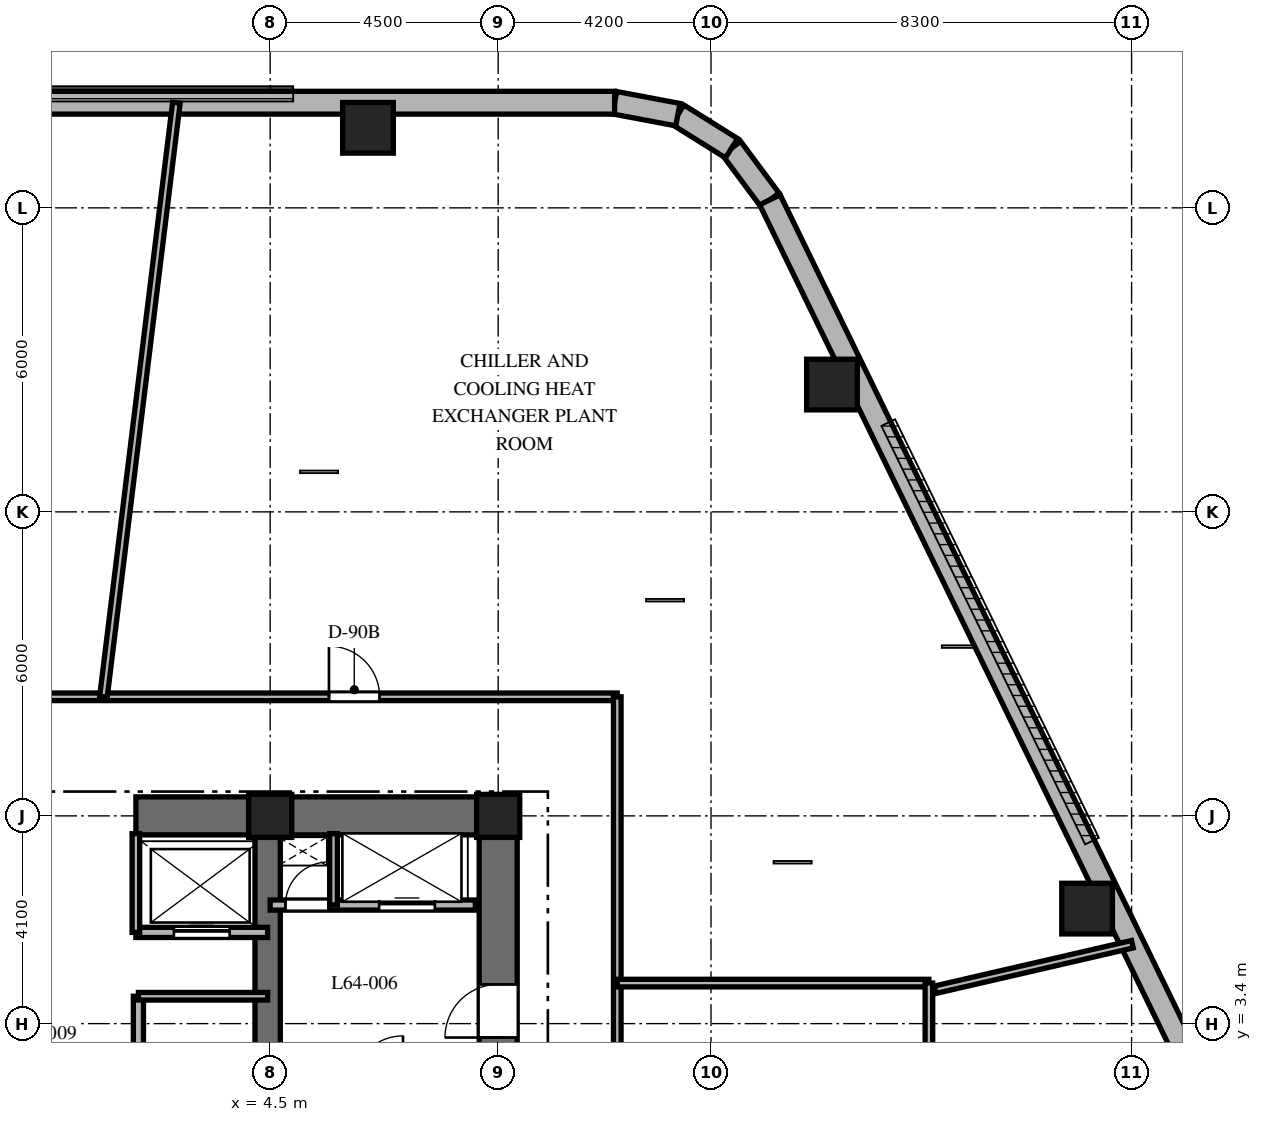
"""IFC4 building model, lengths in metres.
Left out: names, types, materials, properties, quantities, classifications, styles, units other than length and angle.
Written with IfcOpenShell. Run it as: python <this file> out.ifc"""

import sys

from ifc_helpers import new_model, si_unit, direction, frame, frame_2d, origin, origin_2d, place, context, subcontext, project, spatial, rectangle, extrude, element, fill, save


model = new_model("IFC4")
c1 = context("Model", 3, precision=1e-05, world=origin(), true_north=direction((0.0, 1.0)))
c2 = subcontext(c1, "Body", "Model", "MODEL_VIEW")
j1 = project(units=[si_unit("LENGTHUNIT", "METRE"), si_unit("PLANEANGLEUNIT", "RADIAN")], contexts=[c1])
p1 = place(None, origin())
s1 = spatial("IfcSite", under=j1, at=p1, CompositionType="ELEMENT")
p2 = place(p1, origin())
s2 = spatial("IfcBuilding", under=s1, at=p2, CompositionType="ELEMENT")
p3 = place(p2, frame((0.0, 0.0, 255.9)))
s3 = spatial("IfcBuildingStorey", under=s2, at=p3, CompositionType="ELEMENT", Elevation=255.9)
p4 = place(p3, frame((1.85, 7.5, 0.0), z_axis=(0.0, 0.0, 1.0), x_axis=(1.0, 0.0, 0.0)))
e1 = element("IfcWall", 1, at=p4, inside=s3, PredefinedType="SHEAR", context=c2, shape_type="SweptSolid", body=[
    extrude(rectangle(XDim=7.525, YDim=0.75, at=frame_2d((3.762, 0.0))), origin(), (0.0, 0.0, 1.0), 5.4),
])
p5 = place(p3, frame((9.0, -7.125, 0.0), z_axis=(0.0, 0.0, 1.0), x_axis=(0.0, 1.0, 0.0)))
e2 = element("IfcWall", 2, at=p5, inside=s3, PredefinedType="SHEAR", context=c2, shape_type="SweptSolid", body=[
    extrude(rectangle(XDim=14.25, YDim=0.75, at=frame_2d((7.125, 0.0))), origin(), (0.0, 0.0, 1.0), 5.4),
])
p6 = place(p5, frame((10.25, 0.0, 0.0)))
e3 = element("IfcOpeningElement", 3, at=p6, cuts=e2, PredefinedType="OPENING", context=c2, shape_type="SweptSolid", body=[
    extrude(rectangle(XDim=1.05, YDim=2.15, at=frame_2d((0.525, 1.075))), frame((0.0, 0.385, 0.0), z_axis=(0.0, -1.0, 0.0), x_axis=(1.0, 0.0, 0.0)), (0.0, 0.0, 1.0), 0.77),
])
p7 = place(p3, frame((4.45, 2.25, 0.0), z_axis=(0.0, 0.0, 1.0), x_axis=(0.0, 1.0, 0.0)))
e4 = element("IfcWall", 4, at=p7, inside=s3, PredefinedType="SHEAR", context=c2, shape_type="SweptSolid", body=[
    extrude(rectangle(XDim=4.875, YDim=0.5, at=frame_2d((2.438, 0.0))), origin(), (0.0, 0.0, 1.0), 5.4),
])
for number, where, z_axis, x_axis in (
    (5, (9.0, 7.5, 0.0), (0.0, 0.0, 1.0), (1.0, 0.0, 0.0)),
    (6, (4.5, 7.5, 0.0), (0.0, 0.0, 1.0), (1.0, 0.0, 0.0)),
):
    element("IfcColumn", number, at=place(p3, frame(where, z_axis=z_axis, x_axis=x_axis)), inside=s3, PredefinedType="COLUMN", context=c2, shape_type="SweptSolid", body=[
        extrude(rectangle(XDim=0.85, YDim=0.85, at=origin_2d()), origin(), (0.0, 0.0, 1.0), 5.4),
    ])
for number, where, z_axis, x_axis in (
    (7, (20.622, 5.67, 0.0), (0.0, 0.0, 1.0), (1.0, 0.0, 0.0)),
    (8, (15.587, 16.013, 0.0), (0.0, 0.0, 1.0), (1.0, 0.0, 0.0)),
    (9, (6.43, 21.08, 0.0), (0.0, 0.0, 1.0), (1.0, 0.0, 0.0)),
):
    element("IfcColumn", number, at=place(p3, frame(where, z_axis=z_axis, x_axis=x_axis)), inside=s3, PredefinedType="COLUMN", context=c2, shape_type="SweptSolid", body=[
        extrude(rectangle(XDim=1.0, YDim=1.0, at=origin_2d()), origin(), (0.0, 0.0, 1.0), 5.4),
    ])
p8 = place(p3, frame((14.362, 19.658, 0.0), z_axis=(0.0, 0.0, 1.0), x_axis=(-0.596642462792, 0.80250717853, 0.0)))
e10 = element("IfcWall", 10, at=p8, inside=s3, PredefinedType="SOLIDWALL", context=c2, shape_type="SweptSolid", body=[
    extrude(rectangle(XDim=1.27, YDim=0.45, at=frame_2d((0.635, 0.0))), origin(), (0.0, 0.0, 1.0), 5.1),
])
p9 = place(p3, frame((13.604, 20.678, 0.0), z_axis=(0.0, 0.0, 1.0), x_axis=(-0.847910404124, 0.53013955387, 0.0)))
e11 = element("IfcWall", 11, at=p9, inside=s3, PredefinedType="SOLIDWALL", context=c2, shape_type="SweptSolid", body=[
    extrude(rectangle(XDim=1.249, YDim=0.45, at=frame_2d((0.624, 0.0))), origin(), (0.0, 0.0, 1.0), 5.1),
])
p10 = place(p3, frame((12.546, 21.34, 0.0), z_axis=(0.0, 0.0, 1.0), x_axis=(-0.982686750835, 0.18527479519, 0.0)))
e12 = element("IfcWall", 12, at=p10, inside=s3, PredefinedType="SOLIDWALL", context=c2, shape_type="SweptSolid", body=[
    extrude(rectangle(XDim=1.27, YDim=0.45, at=frame_2d((0.635, 0.0))), origin(), (0.0, 0.0, 1.0), 5.1),
])
p11 = place(p3, frame((22.74, 2.452, 0.0), z_axis=(0.0, 0.0, 1.0), x_axis=(-0.437753424814, 0.899095066755, 0.0)))
e13 = element("IfcWall", 13, at=p11, inside=s3, PredefinedType="SOLIDWALL", context=c2, shape_type="SweptSolid", body=[
    extrude(rectangle(XDim=19.137, YDim=0.45, at=frame_2d((9.569, 0.0))), origin(), (0.0, 0.0, 1.0), 5.1),
])
p12 = place(p3, frame((11.298, 21.575, 0.0), z_axis=(0.0, 0.0, 1.0), x_axis=(-1.0, 0.0, 0.0)))
e14 = element("IfcWall", 14, at=p12, inside=s3, PredefinedType="SOLIDWALL", context=c2, shape_type="SweptSolid", body=[
    extrude(rectangle(XDim=24.399, YDim=0.45, at=frame_2d((12.2, 0.0))), origin(), (0.0, 0.0, 1.0), 5.1),
])
p13 = place(p3, frame((4.5, 5.74, 0.0), z_axis=(0.0, 0.0, 1.0), x_axis=(1.0, 0.0, 0.0)))
e15 = element("IfcWall", 15, at=p13, inside=s3, PredefinedType="PARTITIONING", context=c2, shape_type="SweptSolid", body=[
    extrude(rectangle(XDim=4.05, YDim=0.2, at=frame_2d((2.025, 0.0))), origin(), (0.0, 0.0, 1.0), 5.1),
])
p14 = place(p13, frame((0.3, 0.0, 0.0)))
e16 = element("IfcOpeningElement", 16, at=p14, cuts=e15, PredefinedType="OPENING", context=c2, shape_type="SweptSolid", body=[
    extrude(rectangle(XDim=0.85, YDim=2.03, at=frame_2d((0.425, 1.015))), frame((0.0, 0.11, 0.0), z_axis=(0.0, -1.0, 0.0), x_axis=(1.0, 0.0, 0.0)), (0.0, 0.0, 1.0), 0.22),
])
p15 = place(p13, frame((2.15, 0.0, 0.0)))
e17 = element("IfcOpeningElement", 17, at=p15, cuts=e15, PredefinedType="OPENING", context=c2, shape_type="SweptSolid", body=[
    extrude(rectangle(XDim=1.1, YDim=2.2, at=frame_2d((0.55, 1.1))), frame((0.0, 0.11, 0.0), z_axis=(0.0, -1.0, 0.0), x_axis=(1.0, 0.0, 0.0)), (0.0, 0.0, 1.0), 0.22),
])
p16 = place(p3, frame((5.75, 5.74, 0.0), z_axis=(0.0, 0.0, 1.0), x_axis=(0.0, 1.0, 0.0)))
e18 = element("IfcWall", 18, at=p16, inside=s3, PredefinedType="PARTITIONING", context=c2, shape_type="SweptSolid", body=[
    extrude(rectangle(XDim=1.41, YDim=0.15, at=frame_2d((0.705, 0.0))), origin(), (0.0, 0.0, 1.0), 5.1),
])
p17 = place(p3, frame((1.85, 5.2, 0.0), z_axis=(0.0, 0.0, 1.0), x_axis=(1.0, 0.0, 0.0)))
e19 = element("IfcWall", 19, at=p17, inside=s3, PredefinedType="PARTITIONING", context=c2, shape_type="SweptSolid", body=[
    extrude(rectangle(XDim=2.6, YDim=0.2, at=frame_2d((1.3, 0.0))), origin(), (0.0, 0.0, 1.0), 5.1),
])
p18 = place(p17, frame((0.75, 0.0, 0.0)))
e20 = element("IfcOpeningElement", 20, at=p18, cuts=e19, PredefinedType="OPENING", context=c2, shape_type="SweptSolid", body=[
    extrude(rectangle(XDim=1.1, YDim=2.2, at=frame_2d((0.55, 1.1))), frame((0.0, 0.11, 0.0), z_axis=(0.0, -1.0, 0.0), x_axis=(1.0, 0.0, 0.0)), (0.0, 0.0, 1.0), 0.22),
])
p19 = place(p3, frame((1.85, 5.2, 0.0), z_axis=(0.0, 0.0, 1.0), x_axis=(0.0, 1.0, 0.0)))
e21 = element("IfcWall", 21, at=p19, inside=s3, PredefinedType="PARTITIONING", context=c2, shape_type="SweptSolid", body=[
    extrude(rectangle(XDim=1.95, YDim=0.15, at=frame_2d((0.975, 0.0))), origin(), (0.0, 0.0, 1.0), 5.1),
])
p20 = place(p3, frame((1.9, -0.5, 0.0), z_axis=(0.0, 0.0, 1.0), x_axis=(0.0, 1.0, 0.0)))
e22 = element("IfcWall", 22, at=p20, inside=s3, PredefinedType="PARTITIONING", context=c2, shape_type="SweptSolid", body=[
    extrude(rectangle(XDim=4.44, YDim=0.2, at=frame_2d((2.22, 0.0))), origin(), (0.0, 0.0, 1.0), 5.1),
])
p21 = place(p20, frame((1.55, 0.0, 0.0)))
e23 = element("IfcOpeningElement", 23, at=p21, cuts=e22, PredefinedType="OPENING", context=c2, shape_type="SweptSolid", body=[
    extrude(rectangle(XDim=0.85, YDim=2.03, at=frame_2d((0.425, 1.015))), frame((0.0, 0.11, 0.0), z_axis=(0.0, -1.0, 0.0), x_axis=(1.0, 0.0, 0.0)), (0.0, 0.0, 1.0), 0.22),
])
p22 = place(p3, frame((1.9, 3.94, 0.0), z_axis=(0.0, 0.0, 1.0), x_axis=(1.0, 0.0, 0.0)))
e24 = element("IfcWall", 24, at=p22, inside=s3, PredefinedType="PARTITIONING", context=c2, shape_type="SweptSolid", body=[
    extrude(rectangle(XDim=2.55, YDim=0.15, at=frame_2d((1.275, 0.0))), origin(), (0.0, 0.0, 1.0), 5.1),
])
p23 = place(p3, frame((-11.35, 9.85, 0.0), z_axis=(0.0, 0.0, 1.0), x_axis=(1.0, 0.0, 0.0)))
e25 = element("IfcWall", 25, at=p23, inside=s3, PredefinedType="PARTITIONING", context=c2, shape_type="SweptSolid", body=[
    extrude(rectangle(XDim=22.7, YDim=0.15, at=frame_2d((11.35, 0.0))), origin(), (0.0, 0.0, 1.0), 3.29),
])
p24 = place(p23, frame((17.01, 0.0, 0.0)))
e26 = element("IfcOpeningElement", 26, at=p24, cuts=e25, PredefinedType="OPENING", context=c2, shape_type="SweptSolid", body=[
    extrude(rectangle(XDim=1.0, YDim=2.15, at=frame_2d((0.5, 1.075))), frame((0.0, 0.085, 0.0), z_axis=(0.0, -1.0, 0.0), x_axis=(1.0, 0.0, 0.0)), (0.0, 0.0, 1.0), 0.17),
])
p25 = place(p3, frame((11.35, 9.85, 0.0), z_axis=(0.0, 0.0, 1.0), x_axis=(0.0, -1.0, 0.0)))
e27 = element("IfcWall", 27, at=p25, inside=s3, PredefinedType="PARTITIONING", context=c2, shape_type="SweptSolid", body=[
    extrude(rectangle(XDim=19.7, YDim=0.15, at=frame_2d((9.85, 0.0))), origin(), (0.0, 0.0, 1.0), 3.29),
])
p26 = place(p25, frame((7.825, 0.0, 0.0)))
e28 = element("IfcOpeningElement", 28, at=p26, cuts=e27, PredefinedType="OPENING", context=c2, shape_type="SweptSolid", body=[
    extrude(rectangle(XDim=1.05, YDim=2.15, at=frame_2d((0.525, 1.075))), frame((0.0, 0.085, 0.0), z_axis=(0.0, -1.0, 0.0), x_axis=(1.0, 0.0, 0.0)), (0.0, 0.0, 1.0), 0.17),
])
p27 = place(p25, frame((14.755, 0.0, 0.0)))
e29 = element("IfcOpeningElement", 29, at=p27, cuts=e27, PredefinedType="OPENING", context=c2, shape_type="SweptSolid", body=[
    extrude(rectangle(XDim=1.0, YDim=2.15, at=frame_2d((0.5, 1.075))), frame((0.0, 0.085, 0.0), z_axis=(0.0, -1.0, 0.0), x_axis=(1.0, 0.0, 0.0)), (0.0, 0.0, 1.0), 0.17),
])
p28 = place(p3, frame((11.35, 4.2, 0.0), z_axis=(0.0, 0.0, 1.0), x_axis=(1.0, 0.0, 0.0)))
e30 = element("IfcWall", 30, at=p28, inside=s3, PredefinedType="PARTITIONING", context=c2, shape_type="SweptSolid", body=[
    extrude(rectangle(XDim=6.15, YDim=0.15, at=frame_2d((3.075, 0.0))), origin(), (0.0, 0.0, 1.0), 4.541),
])
p29 = place(p3, frame((17.5, -1.2, 0.0), z_axis=(0.0, 0.0, 1.0), x_axis=(0.0, 1.0, 0.0)))
e31 = element("IfcWall", 31, at=p29, inside=s3, PredefinedType="PARTITIONING", context=c2, shape_type="SweptSolid", body=[
    extrude(rectangle(XDim=5.4, YDim=0.15, at=frame_2d((2.7, 0.0))), origin(), (0.0, 0.0, 1.0), 5.1),
])
p30 = place(p3, frame((17.623, 4.069, 0.0), z_axis=(0.0, 0.0, 1.0), x_axis=(0.974369561662, 0.224953233598, 0.0)))
e32 = element("IfcWall", 32, at=p30, inside=s3, PredefinedType="PARTITIONING", context=c2, shape_type="SweptSolid", body=[
    extrude(rectangle(XDim=3.995, YDim=0.15, at=frame_2d((1.998, 0.0))), origin(), (0.0, 0.0, 1.0), 3.29),
])
p31 = place(p3, frame((1.209, 9.85, 0.0), z_axis=(0.0, 0.0, 1.0), x_axis=(0.121874870468, 0.992545472988, 0.0)))
e33 = element("IfcWall", 33, at=p31, inside=s3, PredefinedType="PARTITIONING", context=c2, shape_type="SweptSolid", body=[
    extrude(rectangle(XDim=11.813, YDim=0.15, at=frame_2d((5.906, 0.0))), origin(), (0.0, 0.0, 1.0), 3.29),
])
p32 = place(p6, origin())
e34 = element("IfcDoor", 34, at=p32, inside=s3, OperationType="SINGLE_SWING_LEFT", PredefinedType="DOOR", context=c2, shape_type="SweptSolid", body=[
    extrude(rectangle(XDim=1.05, YDim=2.15, at=frame_2d((0.525, 1.075))), frame((0.0, 0.025, 0.0), z_axis=(0.0, -1.0, 0.0), x_axis=(1.0, 0.0, 0.0)), (0.0, 0.0, 1.0), 0.05),
])
fill(e3, e34)
p33 = place(p14, origin())
e35 = element("IfcDoor", 35, at=p33, inside=s3, OperationType="SINGLE_SWING_RIGHT", PredefinedType="DOOR", context=c2, shape_type="SweptSolid", body=[
    extrude(rectangle(XDim=0.85, YDim=2.03, at=frame_2d((0.425, 1.015))), frame((0.0, 0.025, 0.0), z_axis=(0.0, -1.0, 0.0), x_axis=(1.0, 0.0, 0.0)), (0.0, 0.0, 1.0), 0.05),
])
fill(e16, e35)
p34 = place(p15, origin())
e36 = element("IfcDoor", 36, at=p34, inside=s3, OperationType="SLIDING_TO_RIGHT", PredefinedType="DOOR", context=c2, shape_type="SweptSolid", body=[
    extrude(rectangle(XDim=1.1, YDim=2.2, at=frame_2d((0.55, 1.1))), frame((0.0, 0.025, 0.0), z_axis=(0.0, -1.0, 0.0), x_axis=(1.0, 0.0, 0.0)), (0.0, 0.0, 1.0), 0.05),
])
fill(e17, e36)
p35 = place(p18, origin())
e37 = element("IfcDoor", 37, at=p35, inside=s3, OperationType="SLIDING_TO_RIGHT", PredefinedType="DOOR", context=c2, shape_type="SweptSolid", body=[
    extrude(rectangle(XDim=1.1, YDim=2.2, at=frame_2d((0.55, 1.1))), frame((0.0, 0.025, 0.0), z_axis=(0.0, -1.0, 0.0), x_axis=(1.0, 0.0, 0.0)), (0.0, 0.0, 1.0), 0.05),
])
fill(e20, e37)
p36 = place(p24, origin())
e38 = element("IfcDoor", 38, at=p36, inside=s3, OperationType="SINGLE_SWING_LEFT", PredefinedType="DOOR", context=c2, shape_type="SweptSolid", body=[
    extrude(rectangle(XDim=1.0, YDim=2.15, at=frame_2d((0.5, 1.075))), frame((0.0, 0.025, 0.0), z_axis=(0.0, -1.0, 0.0), x_axis=(1.0, 0.0, 0.0)), (0.0, 0.0, 1.0), 0.05),
])
fill(e26, e38)
save(model, sys.argv[1])
